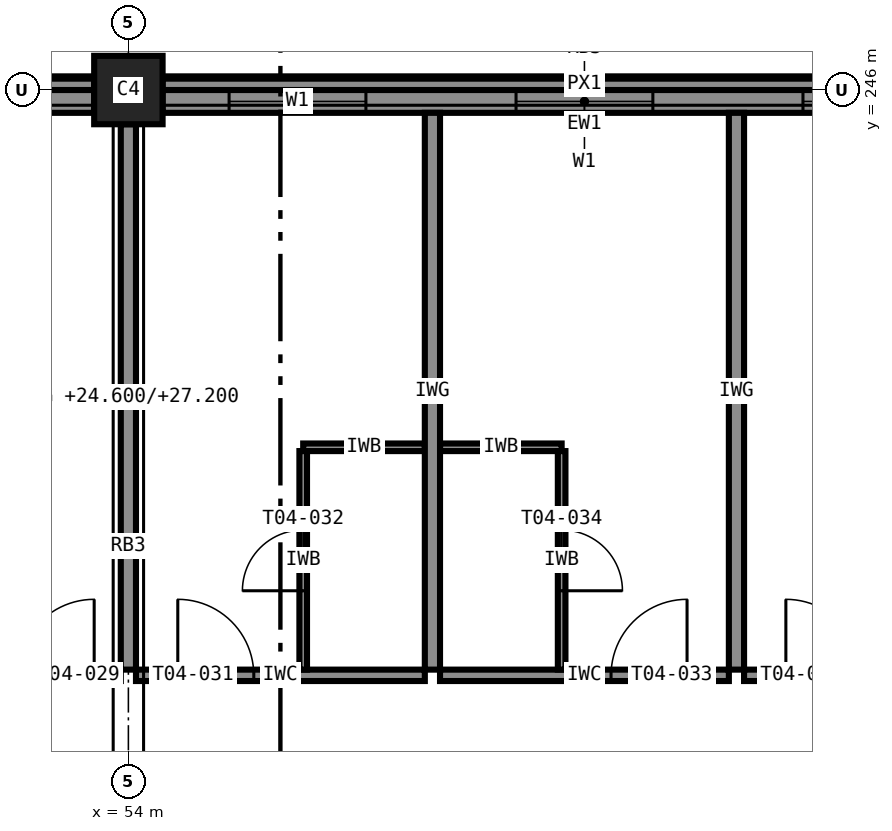
"""IFC4 building model, lengths in metres.
Left out: names, types, materials, properties, quantities, classifications, styles, units other than length and angle.
Written with IfcOpenShell. Run it as: python <this file> out.ifc"""

import sys

from ifc_helpers import new_model, si_unit, direction, frame, frame_2d, origin, origin_2d, place, context, subcontext, project, spatial, rectangle, extrude, element, fill, save


model = new_model("IFC4")
c1 = context("Model", 3, precision=1e-05, world=origin(), true_north=direction((0.0, 1.0)))
c2 = subcontext(c1, "Body", "Model", "MODEL_VIEW")
j1 = project(units=[si_unit("LENGTHUNIT", "METRE"), si_unit("PLANEANGLEUNIT", "RADIAN")], contexts=[c1])
p1 = place(None, origin())
s1 = spatial("IfcSite", under=j1, at=p1, CompositionType="ELEMENT")
p2 = place(p1, origin())
s2 = spatial("IfcBuilding", under=s1, at=p2, CompositionType="ELEMENT")
p3 = place(p2, frame((0.0, 0.0, 24.6)))
s3 = spatial("IfcBuildingStorey", under=s2, at=p3, CompositionType="ELEMENT", Elevation=24.6)
p4 = place(p3, frame((54.0, 246.0, 0.0), z_axis=(0.0, 0.0, 1.0), x_axis=(1.0, 0.0, 0.0)))
e1 = element("IfcColumn", 1, at=p4, inside=s3, PredefinedType="COLUMN", context=c2, shape_type="SweptSolid", body=[
    extrude(rectangle(XDim=0.9, YDim=0.9, at=origin_2d()), origin(), (0.0, 0.0, 1.0), 3.6),
])
p5 = place(p3, frame((65.55, 245.85, 0.0), z_axis=(0.0, 0.0, 1.0), x_axis=(-1.0, 0.0, 0.0)))
e2 = element("IfcWall", 2, at=p5, inside=s3, PredefinedType="STANDARD", context=c2, shape_type="SweptSolid", body=[
    extrude(rectangle(XDim=11.1, YDim=0.3, at=frame_2d((5.55, 0.0))), origin(), (0.0, 0.0, 1.0), 2.6),
])
p6 = place(p5, frame((8.425, 0.0, 0.85)))
e3 = element("IfcOpeningElement", 3, at=p6, cuts=e2, PredefinedType="OPENING", context=c2, shape_type="SweptSolid", body=[
    extrude(rectangle(XDim=1.8, YDim=1.75, at=frame_2d((0.9, 0.875))), frame((0.0, 0.16, 0.0), z_axis=(0.0, -1.0, 0.0), x_axis=(1.0, 0.0, 0.0)), (0.0, 0.0, 1.0), 0.32),
])
p7 = place(p5, frame((4.65, 0.0, 0.85)))
e4 = element("IfcOpeningElement", 4, at=p7, cuts=e2, PredefinedType="OPENING", context=c2, shape_type="SweptSolid", body=[
    extrude(rectangle(XDim=1.8, YDim=1.75, at=frame_2d((0.9, 0.875))), frame((0.0, 0.16, 0.0), z_axis=(0.0, -1.0, 0.0), x_axis=(1.0, 0.0, 0.0)), (0.0, 0.0, 1.0), 0.32),
])
p8 = place(p5, frame((0.875, 0.0, 0.85)))
e5 = element("IfcOpeningElement", 5, at=p8, cuts=e2, PredefinedType="OPENING", context=c2, shape_type="SweptSolid", body=[
    extrude(rectangle(XDim=1.8, YDim=1.75, at=frame_2d((0.9, 0.875))), frame((0.0, 0.16, 0.0), z_axis=(0.0, -1.0, 0.0), x_axis=(1.0, 0.0, 0.0)), (0.0, 0.0, 1.0), 0.32),
])
p9 = place(p3, frame((53.55, 245.85, 0.0), z_axis=(0.0, 0.0, 1.0), x_axis=(-1.0, 0.0, 0.0)))
e6 = element("IfcWall", 6, at=p9, inside=s3, PredefinedType="STANDARD", context=c2, shape_type="SweptSolid", body=[
    extrude(rectangle(XDim=11.1, YDim=0.3, at=frame_2d((5.55, 0.0))), origin(), (0.0, 0.0, 1.0), 2.6),
])
p10 = place(p9, frame((4.45, 0.0, 0.85)))
e7 = element("IfcOpeningElement", 7, at=p10, cuts=e6, PredefinedType="OPENING", context=c2, shape_type="SweptSolid", body=[
    extrude(rectangle(XDim=1.8, YDim=1.75, at=frame_2d((0.9, 0.875))), frame((0.0, 0.16, 0.0), z_axis=(0.0, -1.0, 0.0), x_axis=(1.0, 0.0, 0.0)), (0.0, 0.0, 1.0), 0.32),
])
p11 = place(p9, frame((0.675, 0.0, 0.85)))
e8 = element("IfcOpeningElement", 8, at=p11, cuts=e6, PredefinedType="OPENING", context=c2, shape_type="SweptSolid", body=[
    extrude(rectangle(XDim=1.8, YDim=1.75, at=frame_2d((0.9, 0.875))), frame((0.0, 0.16, 0.0), z_axis=(0.0, -1.0, 0.0), x_axis=(1.0, 0.0, 0.0)), (0.0, 0.0, 1.0), 0.32),
])
for number, where, z_axis, x_axis in (
    (9, (65.55, 246.075, 3.4), (0.0, 0.0, 1.0), (-1.0, 0.0, 0.0)),
    (10, (53.55, 246.075, 3.4), (0.0, 0.0, 1.0), (-1.0, 0.0, 0.0)),
):
    element("IfcWall", number, at=place(p3, frame(where, z_axis=z_axis, x_axis=x_axis)), inside=s3, PredefinedType="STANDARD", context=c2, shape_type="SweptSolid", body=[
        extrude(rectangle(XDim=11.1, YDim=0.15, at=frame_2d((5.55, 0.0))), origin(), (0.0, 0.0, 1.0), 0.2),
    ])
p12 = place(p3, frame((50.5, 238.3, 0.0), z_axis=(0.0, 0.0, 1.0), x_axis=(1.0, 0.0, 0.0)))
e11 = element("IfcWall", 11, at=p12, inside=s3, PredefinedType="PARTITIONING", context=c2, shape_type="SweptSolid", body=[
    extrude(rectangle(XDim=3.4, YDim=0.15, at=frame_2d((1.7, 0.0))), origin(), (0.0, 0.0, 1.0), 3.4),
])
p13 = place(p12, frame((2.05, 0.0, 0.0)))
e12 = element("IfcOpeningElement", 12, at=p13, cuts=e11, PredefinedType="OPENING", context=c2, shape_type="SweptSolid", body=[
    extrude(rectangle(XDim=1.0, YDim=2.1, at=frame_2d((0.5, 1.05))), frame((0.0, 0.085, 0.0), z_axis=(0.0, -1.0, 0.0), x_axis=(1.0, 0.0, 0.0)), (0.0, 0.0, 1.0), 0.17),
])
p14 = place(p3, frame((54.1, 238.3, 0.0), z_axis=(0.0, 0.0, 1.0), x_axis=(1.0, 0.0, 0.0)))
e13 = element("IfcWall", 13, at=p14, inside=s3, PredefinedType="PARTITIONING", context=c2, shape_type="SweptSolid", body=[
    extrude(rectangle(XDim=3.8, YDim=0.15, at=frame_2d((1.9, 0.0))), origin(), (0.0, 0.0, 1.0), 3.4),
])
p15 = place(p14, frame((0.55, 0.0, 0.0)))
e14 = element("IfcOpeningElement", 14, at=p15, cuts=e13, PredefinedType="OPENING", context=c2, shape_type="SweptSolid", body=[
    extrude(rectangle(XDim=1.0, YDim=2.1, at=frame_2d((0.5, 1.05))), frame((0.0, 0.085, 0.0), z_axis=(0.0, -1.0, 0.0), x_axis=(1.0, 0.0, 0.0)), (0.0, 0.0, 1.0), 0.17),
])
p16 = place(p3, frame((56.3, 241.3, 0.0), z_axis=(0.0, 0.0, 1.0), x_axis=(1.0, 0.0, 0.0)))
e15 = element("IfcWall", 15, at=p16, inside=s3, PredefinedType="PARTITIONING", context=c2, shape_type="SweptSolid", body=[
    extrude(rectangle(XDim=1.6, YDim=0.1, at=frame_2d((0.8, 0.0))), origin(), (0.0, 0.0, 1.0), 3.4),
])
p17 = place(p3, frame((56.3, 238.375, 0.0), z_axis=(0.0, 0.0, 1.0), x_axis=(0.0, 1.0, 0.0)))
e16 = element("IfcWall", 16, at=p17, inside=s3, PredefinedType="PARTITIONING", context=c2, shape_type="SweptSolid", body=[
    extrude(rectangle(XDim=2.875, YDim=0.1, at=frame_2d((1.438, 0.0))), origin(), (0.0, 0.0, 1.0), 3.4),
])
p18 = place(p17, frame((1.038, 0.0, 0.0)))
e17 = element("IfcOpeningElement", 17, at=p18, cuts=e16, PredefinedType="OPENING", context=c2, shape_type="SweptSolid", body=[
    extrude(rectangle(XDim=0.8, YDim=2.1, at=frame_2d((0.4, 1.05))), frame((0.0, 0.06, 0.0), z_axis=(0.0, -1.0, 0.0), x_axis=(1.0, 0.0, 0.0)), (0.0, 0.0, 1.0), 0.12),
])
p19 = place(p3, frame((58.1, 238.3, 0.0), z_axis=(0.0, 0.0, 1.0), x_axis=(1.0, 0.0, 0.0)))
e18 = element("IfcWall", 18, at=p19, inside=s3, PredefinedType="PARTITIONING", context=c2, shape_type="SweptSolid", body=[
    extrude(rectangle(XDim=3.8, YDim=0.15, at=frame_2d((1.9, 0.0))), origin(), (0.0, 0.0, 1.0), 3.4),
])
p20 = place(p19, frame((2.25, 0.0, 0.0)))
e19 = element("IfcOpeningElement", 19, at=p20, cuts=e18, PredefinedType="OPENING", context=c2, shape_type="SweptSolid", body=[
    extrude(rectangle(XDim=1.0, YDim=2.1, at=frame_2d((0.5, 1.05))), frame((0.0, 0.085, 0.0), z_axis=(0.0, -1.0, 0.0), x_axis=(1.0, 0.0, 0.0)), (0.0, 0.0, 1.0), 0.17),
])
p21 = place(p3, frame((58.1, 241.3, 0.0), z_axis=(0.0, 0.0, 1.0), x_axis=(1.0, 0.0, 0.0)))
e20 = element("IfcWall", 20, at=p21, inside=s3, PredefinedType="PARTITIONING", context=c2, shape_type="SweptSolid", body=[
    extrude(rectangle(XDim=1.6, YDim=0.1, at=frame_2d((0.8, 0.0))), origin(), (0.0, 0.0, 1.0), 3.4),
])
p22 = place(p3, frame((59.7, 241.25, 0.0), z_axis=(0.0, 0.0, 1.0), x_axis=(0.0, -1.0, 0.0)))
e21 = element("IfcWall", 21, at=p22, inside=s3, PredefinedType="PARTITIONING", context=c2, shape_type="SweptSolid", body=[
    extrude(rectangle(XDim=2.875, YDim=0.1, at=frame_2d((1.438, 0.0))), origin(), (0.0, 0.0, 1.0), 3.4),
])
p23 = place(p22, frame((1.038, 0.0, 0.0)))
e22 = element("IfcOpeningElement", 22, at=p23, cuts=e21, PredefinedType="OPENING", context=c2, shape_type="SweptSolid", body=[
    extrude(rectangle(XDim=0.8, YDim=2.1, at=frame_2d((0.4, 1.05))), frame((0.0, 0.06, 0.0), z_axis=(0.0, -1.0, 0.0), x_axis=(1.0, 0.0, 0.0)), (0.0, 0.0, 1.0), 0.12),
])
p24 = place(p3, frame((62.1, 238.3, 0.0), z_axis=(0.0, 0.0, 1.0), x_axis=(1.0, 0.0, 0.0)))
e23 = element("IfcWall", 23, at=p24, inside=s3, PredefinedType="PARTITIONING", context=c2, shape_type="SweptSolid", body=[
    extrude(rectangle(XDim=3.8, YDim=0.15, at=frame_2d((1.9, 0.0))), origin(), (0.0, 0.0, 1.0), 3.4),
])
p25 = place(p24, frame((0.55, 0.0, 0.0)))
e24 = element("IfcOpeningElement", 24, at=p25, cuts=e23, PredefinedType="OPENING", context=c2, shape_type="SweptSolid", body=[
    extrude(rectangle(XDim=1.0, YDim=2.1, at=frame_2d((0.5, 1.05))), frame((0.0, 0.085, 0.0), z_axis=(0.0, -1.0, 0.0), x_axis=(1.0, 0.0, 0.0)), (0.0, 0.0, 1.0), 0.17),
])
p26 = place(p3, frame((54.0, 245.55, 0.0), z_axis=(0.0, 0.0, 1.0), x_axis=(0.0, -1.0, 0.0)))
e25 = element("IfcWall", 25, at=p26, inside=s3, PredefinedType="PARTITIONING", context=c2, shape_type="SweptSolid", body=[
    extrude(rectangle(XDim=7.175, YDim=0.2, at=frame_2d((3.587, 0.0))), origin(), (0.0, 0.0, 1.0), 2.6),
])
for number, where, z_axis, x_axis in (
    (26, (58.0, 245.7, 0.0), (0.0, 0.0, 1.0), (0.0, -1.0, 0.0)),
    (27, (62.0, 245.7, 0.0), (0.0, 0.0, 1.0), (0.0, -1.0, 0.0)),
):
    element("IfcWall", number, at=place(p3, frame(where, z_axis=z_axis, x_axis=x_axis)), inside=s3, PredefinedType="PARTITIONING", context=c2, shape_type="SweptSolid", body=[
        extrude(rectangle(XDim=7.325, YDim=0.2, at=frame_2d((3.663, 0.0))), origin(), (0.0, 0.0, 1.0), 3.4),
    ])
p27 = place(p6, origin())
e28 = element("IfcWindow", 28, at=p27, inside=s3, PartitioningType="SINGLE_PANEL", PredefinedType="WINDOW", context=c2, shape_type="SweptSolid", body=[
    extrude(rectangle(XDim=1.8, YDim=1.75, at=frame_2d((0.9, 0.875))), frame((0.0, 0.03, 0.0), z_axis=(0.0, -1.0, 0.0), x_axis=(1.0, 0.0, 0.0)), (0.0, 0.0, 1.0), 0.06),
])
fill(e3, e28)
p28 = place(p7, origin())
e29 = element("IfcWindow", 29, at=p28, inside=s3, PartitioningType="SINGLE_PANEL", PredefinedType="WINDOW", context=c2, shape_type="SweptSolid", body=[
    extrude(rectangle(XDim=1.8, YDim=1.75, at=frame_2d((0.9, 0.875))), frame((0.0, 0.03, 0.0), z_axis=(0.0, -1.0, 0.0), x_axis=(1.0, 0.0, 0.0)), (0.0, 0.0, 1.0), 0.06),
])
fill(e4, e29)
p29 = place(p8, origin())
e30 = element("IfcWindow", 30, at=p29, inside=s3, PartitioningType="SINGLE_PANEL", PredefinedType="WINDOW", context=c2, shape_type="SweptSolid", body=[
    extrude(rectangle(XDim=1.8, YDim=1.75, at=frame_2d((0.9, 0.875))), frame((0.0, 0.03, 0.0), z_axis=(0.0, -1.0, 0.0), x_axis=(1.0, 0.0, 0.0)), (0.0, 0.0, 1.0), 0.06),
])
fill(e5, e30)
p30 = place(p13, origin())
e31 = element("IfcDoor", 31, at=p30, inside=s3, OperationType="SINGLE_SWING_RIGHT", PredefinedType="DOOR", context=c2, shape_type="SweptSolid", body=[
    extrude(rectangle(XDim=1.0, YDim=2.1, at=frame_2d((0.5, 1.05))), frame((0.0, 0.025, 0.0), z_axis=(0.0, -1.0, 0.0), x_axis=(1.0, 0.0, 0.0)), (0.0, 0.0, 1.0), 0.05),
])
fill(e12, e31)
p31 = place(p15, origin())
e32 = element("IfcDoor", 32, at=p31, inside=s3, OperationType="SINGLE_SWING_LEFT", PredefinedType="DOOR", context=c2, shape_type="SweptSolid", body=[
    extrude(rectangle(XDim=1.0, YDim=2.1, at=frame_2d((0.5, 1.05))), frame((0.0, 0.025, 0.0), z_axis=(0.0, -1.0, 0.0), x_axis=(1.0, 0.0, 0.0)), (0.0, 0.0, 1.0), 0.05),
])
fill(e14, e32)
p32 = place(p18, origin())
e33 = element("IfcDoor", 33, at=p32, inside=s3, OperationType="SINGLE_SWING_LEFT", PredefinedType="DOOR", context=c2, shape_type="SweptSolid", body=[
    extrude(rectangle(XDim=0.8, YDim=2.1, at=frame_2d((0.4, 1.05))), frame((0.0, 0.025, 0.0), z_axis=(0.0, -1.0, 0.0), x_axis=(1.0, 0.0, 0.0)), (0.0, 0.0, 1.0), 0.05),
])
fill(e17, e33)
p33 = place(p20, origin())
e34 = element("IfcDoor", 34, at=p33, inside=s3, OperationType="SINGLE_SWING_RIGHT", PredefinedType="DOOR", context=c2, shape_type="SweptSolid", body=[
    extrude(rectangle(XDim=1.0, YDim=2.1, at=frame_2d((0.5, 1.05))), frame((0.0, 0.025, 0.0), z_axis=(0.0, -1.0, 0.0), x_axis=(1.0, 0.0, 0.0)), (0.0, 0.0, 1.0), 0.05),
])
fill(e19, e34)
p34 = place(p23, origin())
e35 = element("IfcDoor", 35, at=p34, inside=s3, OperationType="SINGLE_SWING_RIGHT", PredefinedType="DOOR", context=c2, shape_type="SweptSolid", body=[
    extrude(rectangle(XDim=0.8, YDim=2.1, at=frame_2d((0.4, 1.05))), frame((0.0, 0.025, 0.0), z_axis=(0.0, -1.0, 0.0), x_axis=(1.0, 0.0, 0.0)), (0.0, 0.0, 1.0), 0.05),
])
fill(e22, e35)
p35 = place(p25, origin())
e36 = element("IfcDoor", 36, at=p35, inside=s3, OperationType="SINGLE_SWING_LEFT", PredefinedType="DOOR", context=c2, shape_type="SweptSolid", body=[
    extrude(rectangle(XDim=1.0, YDim=2.1, at=frame_2d((0.5, 1.05))), frame((0.0, 0.025, 0.0), z_axis=(0.0, -1.0, 0.0), x_axis=(1.0, 0.0, 0.0)), (0.0, 0.0, 1.0), 0.05),
])
fill(e24, e36)
save(model, sys.argv[1])
